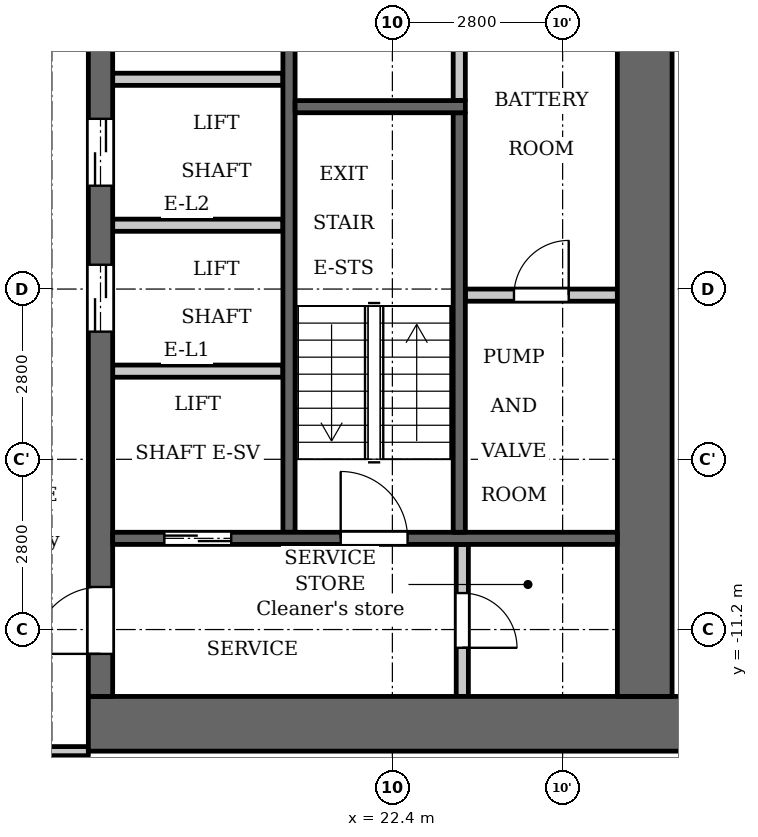
"""IFC4 building model, lengths in metres.
Left out: names, types, materials, properties, quantities, classifications, styles, units other than length and angle.
Written with IfcOpenShell. Run it as: python <this file> out.ifc"""

import sys

from ifc_helpers import new_model, si_unit, direction, frame, frame_2d, origin, place, context, subcontext, project, spatial, rectangle, extrude, element, fill, save


model = new_model("IFC4")
c1 = context("Model", 3, precision=1e-05, world=origin(), true_north=direction((0.0, 1.0)))
c2 = subcontext(c1, "Body", "Model", "MODEL_VIEW")
j1 = project(units=[si_unit("LENGTHUNIT", "METRE"), si_unit("PLANEANGLEUNIT", "RADIAN")], contexts=[c1])
p1 = place(None, origin())
s1 = spatial("IfcSite", under=j1, at=p1, CompositionType="ELEMENT")
p2 = place(p1, origin())
s2 = spatial("IfcBuilding", under=s1, at=p2, CompositionType="ELEMENT")
p3 = place(p2, frame((0.0, 0.0, 58.5)))
s3 = spatial("IfcBuildingStorey", under=s2, at=p3, CompositionType="ELEMENT", Elevation=58.5)
p4 = place(p3, frame((23.5, -2.5, 0.0), z_axis=(0.0, 0.0, 1.0), x_axis=(0.0, 1.0, 0.0)))
e1 = element("IfcWall", 1, at=p4, inside=s3, PredefinedType="PARTITIONING", context=c2, shape_type="SweptSolid", body=[
    extrude(rectangle(XDim=2.65, YDim=0.2, at=frame_2d((1.325, 0.0))), origin(), (0.0, 0.0, 1.0), 3.2),
])
p5 = place(p3, frame((20.7, -9.6, 0.0), z_axis=(0.0, 0.0, 1.0), x_axis=(0.0, 1.0, 0.0)))
e2 = element("IfcWall", 2, at=p5, inside=s3, PredefinedType="SHEAR", context=c2, shape_type="SweptSolid", body=[
    extrude(rectangle(XDim=9.75, YDim=0.2, at=frame_2d((4.875, 0.0))), origin(), (0.0, 0.0, 1.0), 3.2),
])
p6 = place(p3, frame((17.4, -12.75, 0.0), z_axis=(0.0, 0.0, 1.0), x_axis=(1.0, 0.0, 0.0)))
e3 = element("IfcWall", 3, at=p6, inside=s3, PredefinedType="SHEAR", context=c2, shape_type="SweptSolid", body=[
    extrude(rectangle(XDim=10.4, YDim=0.9, at=frame_2d((5.2, 0.0))), origin(), (0.0, 0.0, 1.0), 3.2),
])
p7 = place(p3, frame((17.6, -12.3, 0.0), z_axis=(0.0, 0.0, 1.0), x_axis=(0.0, 1.0, 0.0)))
e4 = element("IfcWall", 4, at=p7, inside=s3, PredefinedType="SHEAR", context=c2, shape_type="SweptSolid", body=[
    extrude(rectangle(XDim=24.6, YDim=0.4, at=frame_2d((12.3, 0.0))), origin(), (0.0, 0.0, 1.0), 3.2),
])
p8 = place(p7, frame((6.0, 0.0, 0.0)))
e5 = element("IfcOpeningElement", 5, at=p8, cuts=e4, PredefinedType="OPENING", context=c2, shape_type="SweptSolid", body=[
    extrude(rectangle(XDim=1.1, YDim=2.1, at=frame_2d((0.55, 1.05))), frame((0.0, 0.21, 0.0), z_axis=(0.0, -1.0, 0.0), x_axis=(1.0, 0.0, 0.0)), (0.0, 0.0, 1.0), 0.42),
])
p9 = place(p7, frame((8.4, 0.0, 0.0)))
e6 = element("IfcOpeningElement", 6, at=p9, cuts=e4, PredefinedType="OPENING", context=c2, shape_type="SweptSolid", body=[
    extrude(rectangle(XDim=1.1, YDim=2.1, at=frame_2d((0.55, 1.05))), frame((0.0, 0.21, 0.0), z_axis=(0.0, -1.0, 0.0), x_axis=(1.0, 0.0, 0.0)), (0.0, 0.0, 1.0), 0.42),
])
p10 = place(p7, frame((10.8, 0.0, 0.0)))
e7 = element("IfcOpeningElement", 7, at=p10, cuts=e4, PredefinedType="OPENING", context=c2, shape_type="SweptSolid", body=[
    extrude(rectangle(XDim=1.1, YDim=2.1, at=frame_2d((0.55, 1.05))), frame((0.0, 0.21, 0.0), z_axis=(0.0, -1.0, 0.0), x_axis=(1.0, 0.0, 0.0)), (0.0, 0.0, 1.0), 0.42),
])
p11 = place(p7, frame((16.75, 0.0, 0.0)))
e8 = element("IfcOpeningElement", 8, at=p11, cuts=e4, PredefinedType="OPENING", context=c2, shape_type="SweptSolid", body=[
    extrude(rectangle(XDim=0.9, YDim=2.1, at=frame_2d((0.45, 1.05))), frame((0.0, 0.21, 0.0), z_axis=(0.0, -1.0, 0.0), x_axis=(1.0, 0.0, 0.0)), (0.0, 0.0, 1.0), 0.42),
])
p12 = place(p7, frame((22.8, 0.0, 0.0)))
e9 = element("IfcOpeningElement", 9, at=p12, cuts=e4, PredefinedType="OPENING", context=c2, shape_type="SweptSolid", body=[
    extrude(rectangle(XDim=1.1, YDim=2.1, at=frame_2d((0.55, 1.05))), frame((0.0, 0.21, 0.0), z_axis=(0.0, -1.0, 0.0), x_axis=(1.0, 0.0, 0.0)), (0.0, 0.0, 1.0), 0.42),
])
p13 = place(p7, frame((0.7, 0.0, 0.0)))
e10 = element("IfcOpeningElement", 10, at=p13, cuts=e4, PredefinedType="OPENING", context=c2, shape_type="SweptSolid", body=[
    extrude(rectangle(XDim=1.1, YDim=2.1, at=frame_2d((0.55, 1.05))), frame((0.0, 0.21, 0.0), z_axis=(0.0, -1.0, 0.0), x_axis=(1.0, 0.0, 0.0)), (0.0, 0.0, 1.0), 0.42),
])
p14 = place(p7, frame((12.775, 0.0, 0.0)))
e11 = element("IfcOpeningElement", 11, at=p14, cuts=e4, PredefinedType="OPENING", context=c2, shape_type="SweptSolid", body=[
    extrude(rectangle(XDim=1.8, YDim=2.1, at=frame_2d((0.9, 1.05))), frame((0.0, 0.21, 0.0), z_axis=(0.0, -1.0, 0.0), x_axis=(1.0, 0.0, 0.0)), (0.0, 0.0, 1.0), 0.42),
])
p15 = place(p3, frame((26.55, -12.3, 0.0), z_axis=(0.0, 0.0, 1.0), x_axis=(0.0, 1.0, 0.0)))
e12 = element("IfcWall", 12, at=p15, inside=s3, PredefinedType="SHEAR", context=c2, shape_type="SweptSolid", body=[
    extrude(rectangle(XDim=24.6, YDim=0.9, at=frame_2d((12.3, 0.0))), origin(), (0.0, 0.0, 1.0), 3.2),
])
p16 = place(p3, frame((23.55, -12.3, 0.0), z_axis=(0.0, 0.0, 1.0), x_axis=(0.0, 1.0, 0.0)))
e13 = element("IfcWall", 13, at=p16, inside=s3, PredefinedType="PARTITIONING", context=c2, shape_type="SweptSolid", body=[
    extrude(rectangle(XDim=2.5, YDim=0.2, at=frame_2d((1.25, 0.0))), origin(), (0.0, 0.0, 1.0), 3.2),
])
p17 = place(p16, frame((0.8, 0.0, 0.0)))
e14 = element("IfcOpeningElement", 14, at=p17, cuts=e13, PredefinedType="OPENING", context=c2, shape_type="SweptSolid", body=[
    extrude(rectangle(XDim=0.9, YDim=2.1, at=frame_2d((0.45, 1.05))), frame((0.0, 0.11, 0.0), z_axis=(0.0, -1.0, 0.0), x_axis=(1.0, 0.0, 0.0)), (0.0, 0.0, 1.0), 0.22),
])
p18 = place(p3, frame((23.6, -5.7, 0.0), z_axis=(0.0, 0.0, 1.0), x_axis=(1.0, 0.0, 0.0)))
e15 = element("IfcWall", 15, at=p18, inside=s3, PredefinedType="PARTITIONING", context=c2, shape_type="SweptSolid", body=[
    extrude(rectangle(XDim=2.5, YDim=0.2, at=frame_2d((1.25, 0.0))), origin(), (0.0, 0.0, 1.0), 3.2),
])
p19 = place(p18, frame((0.8, 0.0, 0.0)))
e16 = element("IfcOpeningElement", 16, at=p19, cuts=e15, PredefinedType="OPENING", context=c2, shape_type="SweptSolid", body=[
    extrude(rectangle(XDim=0.9, YDim=2.1, at=frame_2d((0.45, 1.05))), frame((0.0, 0.11, 0.0), z_axis=(0.0, -1.0, 0.0), x_axis=(1.0, 0.0, 0.0)), (0.0, 0.0, 1.0), 0.22),
])
p20 = place(p3, frame((17.8, -9.7, 0.0), z_axis=(0.0, 0.0, 1.0), x_axis=(1.0, 0.0, 0.0)))
e17 = element("IfcWall", 17, at=p20, inside=s3, PredefinedType="SHEAR", context=c2, shape_type="SweptSolid", body=[
    extrude(rectangle(XDim=8.3, YDim=0.2, at=frame_2d((4.15, 0.0))), origin(), (0.0, 0.0, 1.0), 3.2),
])
p21 = place(p20, frame((0.85, 0.0, 0.0)))
e18 = element("IfcOpeningElement", 18, at=p21, cuts=e17, PredefinedType="OPENING", context=c2, shape_type="SweptSolid", body=[
    extrude(rectangle(XDim=1.1, YDim=2.1, at=frame_2d((0.55, 1.05))), frame((0.0, 0.11, 0.0), z_axis=(0.0, -1.0, 0.0), x_axis=(1.0, 0.0, 0.0)), (0.0, 0.0, 1.0), 0.22),
])
p22 = place(p20, frame((3.75, 0.0, 0.0)))
e19 = element("IfcOpeningElement", 19, at=p22, cuts=e17, PredefinedType="OPENING", context=c2, shape_type="SweptSolid", body=[
    extrude(rectangle(XDim=1.1, YDim=2.1, at=frame_2d((0.55, 1.05))), frame((0.0, 0.11, 0.0), z_axis=(0.0, -1.0, 0.0), x_axis=(1.0, 0.0, 0.0)), (0.0, 0.0, 1.0), 0.22),
])
for number, where, z_axis, x_axis in (
    (20, (17.8, -6.95, 0.0), (0.0, 0.0, 1.0), (1.0, 0.0, 0.0)),
    (21, (17.8, -4.55, 0.0), (0.0, 0.0, 1.0), (1.0, 0.0, 0.0)),
    (22, (17.8, -2.15, 0.0), (0.0, 0.0, 1.0), (1.0, 0.0, 0.0)),
):
    element("IfcWall", number, at=place(p3, frame(where, z_axis=z_axis, x_axis=x_axis)), inside=s3, PredefinedType="PARTITIONING", context=c2, shape_type="SweptSolid", body=[
        extrude(rectangle(XDim=2.8, YDim=0.2, at=frame_2d((1.4, 0.0))), origin(), (0.0, 0.0, 1.0), 3.2),
    ])
p23 = place(p3, frame((23.5, -9.6, 0.0), z_axis=(0.0, 0.0, 1.0), x_axis=(0.0, 1.0, 0.0)))
e23 = element("IfcWall", 23, at=p23, inside=s3, PredefinedType="SHEAR", context=c2, shape_type="SweptSolid", body=[
    extrude(rectangle(XDim=6.9, YDim=0.2, at=frame_2d((3.45, 0.0))), origin(), (0.0, 0.0, 1.0), 3.2),
])
p24 = place(p3, frame((20.8, -2.6, 0.0), z_axis=(0.0, 0.0, 1.0), x_axis=(1.0, 0.0, 0.0)))
e24 = element("IfcWall", 24, at=p24, inside=s3, PredefinedType="SHEAR", context=c2, shape_type="SweptSolid", body=[
    extrude(rectangle(XDim=2.8, YDim=0.2, at=frame_2d((1.4, 0.0))), origin(), (0.0, 0.0, 1.0), 3.2),
])
p25 = place(p3, frame((-17.4, -13.2, 0.0), z_axis=(0.0, 0.0, 1.0), x_axis=(1.0, 0.0, 0.0)))
e25 = element("IfcWall", 25, at=p25, inside=s3, PredefinedType="PARTITIONING", context=c2, shape_type="SweptSolid", body=[
    extrude(rectangle(XDim=34.8, YDim=0.15, at=frame_2d((17.4, 0.0))), origin(), (0.0, 0.0, 1.0), 3.2),
])
p26 = place(p25, frame((0.65, 0.0, 0.0)))
e26 = element("IfcOpeningElement", 26, at=p26, cuts=e25, PredefinedType="OPENING", context=c2, shape_type="SweptSolid", body=[
    extrude(rectangle(XDim=1.0, YDim=2.1, at=frame_2d((0.5, 1.05))), frame((0.0, 0.085, 0.0), z_axis=(0.0, -1.0, 0.0), x_axis=(1.0, 0.0, 0.0)), (0.0, 0.0, 1.0), 0.17),
])
p27 = place(p25, frame((33.05, 0.0, 0.0)))
e27 = element("IfcOpeningElement", 27, at=p27, cuts=e25, PredefinedType="OPENING", context=c2, shape_type="SweptSolid", body=[
    extrude(rectangle(XDim=1.0, YDim=2.1, at=frame_2d((0.5, 1.05))), frame((0.0, 0.085, 0.0), z_axis=(0.0, -1.0, 0.0), x_axis=(1.0, 0.0, 0.0)), (0.0, 0.0, 1.0), 0.17),
])
p28 = place(p25, frame((10.15, 0.0, 0.0)))
e28 = element("IfcOpeningElement", 28, at=p28, cuts=e25, PredefinedType="OPENING", context=c2, shape_type="SweptSolid", body=[
    extrude(rectangle(XDim=1.0, YDim=2.1, at=frame_2d((0.5, 1.05))), frame((0.0, 0.085, 0.0), z_axis=(0.0, -1.0, 0.0), x_axis=(1.0, 0.0, 0.0)), (0.0, 0.0, 1.0), 0.17),
])
p29 = place(p25, frame((21.35, 0.0, 0.0)))
e29 = element("IfcOpeningElement", 29, at=p29, cuts=e25, PredefinedType="OPENING", context=c2, shape_type="SweptSolid", body=[
    extrude(rectangle(XDim=1.0, YDim=2.1, at=frame_2d((0.5, 1.05))), frame((0.0, 0.085, 0.0), z_axis=(0.0, -1.0, 0.0), x_axis=(1.0, 0.0, 0.0)), (0.0, 0.0, 1.0), 0.17),
])
p30 = place(p25, frame((30.75, 0.0, 0.0)))
e30 = element("IfcOpeningElement", 30, at=p30, cuts=e25, PredefinedType="OPENING", context=c2, shape_type="SweptSolid", body=[
    extrude(rectangle(XDim=1.0, YDim=2.1, at=frame_2d((0.5, 1.05))), frame((0.0, 0.085, 0.0), z_axis=(0.0, -1.0, 0.0), x_axis=(1.0, 0.0, 0.0)), (0.0, 0.0, 1.0), 0.17),
])
p31 = place(p21, origin())
e31 = element("IfcDoor", 31, at=p31, inside=s3, OperationType="DOUBLE_DOOR_SLIDING", PredefinedType="DOOR", context=c2, shape_type="SweptSolid", body=[
    extrude(rectangle(XDim=1.1, YDim=2.1, at=frame_2d((0.55, 1.05))), frame((0.0, 0.025, 0.0), z_axis=(0.0, -1.0, 0.0), x_axis=(1.0, 0.0, 0.0)), (0.0, 0.0, 1.0), 0.05),
])
fill(e18, e31)
p32 = place(p8, origin())
e32 = element("IfcDoor", 32, at=p32, inside=s3, OperationType="DOUBLE_DOOR_SLIDING", PredefinedType="DOOR", context=c2, shape_type="SweptSolid", body=[
    extrude(rectangle(XDim=1.1, YDim=2.1, at=frame_2d((0.55, 1.05))), frame((0.0, 0.025, 0.0), z_axis=(0.0, -1.0, 0.0), x_axis=(1.0, 0.0, 0.0)), (0.0, 0.0, 1.0), 0.05),
])
fill(e5, e32)
p33 = place(p9, origin())
e33 = element("IfcDoor", 33, at=p33, inside=s3, OperationType="DOUBLE_DOOR_SLIDING", PredefinedType="DOOR", context=c2, shape_type="SweptSolid", body=[
    extrude(rectangle(XDim=1.1, YDim=2.1, at=frame_2d((0.55, 1.05))), frame((0.0, 0.025, 0.0), z_axis=(0.0, -1.0, 0.0), x_axis=(1.0, 0.0, 0.0)), (0.0, 0.0, 1.0), 0.05),
])
fill(e6, e33)
p34 = place(p13, origin())
e34 = element("IfcDoor", 34, at=p34, inside=s3, OperationType="SINGLE_SWING_RIGHT", PredefinedType="DOOR", context=c2, shape_type="SweptSolid", body=[
    extrude(rectangle(XDim=1.1, YDim=2.1, at=frame_2d((0.55, 1.05))), frame((0.0, 0.025, 0.0), z_axis=(0.0, -1.0, 0.0), x_axis=(1.0, 0.0, 0.0)), (0.0, 0.0, 1.0), 0.05),
])
fill(e10, e34)
p35 = place(p17, origin())
e35 = element("IfcDoor", 35, at=p35, inside=s3, OperationType="SINGLE_SWING_LEFT", PredefinedType="DOOR", context=c2, shape_type="SweptSolid", body=[
    extrude(rectangle(XDim=0.9, YDim=2.1, at=frame_2d((0.45, 1.05))), frame((0.0, 0.025, 0.0), z_axis=(0.0, -1.0, 0.0), x_axis=(1.0, 0.0, 0.0)), (0.0, 0.0, 1.0), 0.05),
])
fill(e14, e35)
p36 = place(p22, origin())
e36 = element("IfcDoor", 36, at=p36, inside=s3, OperationType="SINGLE_SWING_RIGHT", PredefinedType="DOOR", context=c2, shape_type="SweptSolid", body=[
    extrude(rectangle(XDim=1.1, YDim=2.1, at=frame_2d((0.55, 1.05))), frame((0.0, 0.025, 0.0), z_axis=(0.0, -1.0, 0.0), x_axis=(1.0, 0.0, 0.0)), (0.0, 0.0, 1.0), 0.05),
])
fill(e19, e36)
p37 = place(p19, origin())
e37 = element("IfcDoor", 37, at=p37, inside=s3, OperationType="SINGLE_SWING_LEFT", PredefinedType="DOOR", context=c2, shape_type="SweptSolid", body=[
    extrude(rectangle(XDim=0.9, YDim=2.1, at=frame_2d((0.45, 1.05))), frame((0.0, 0.025, 0.0), z_axis=(0.0, -1.0, 0.0), x_axis=(1.0, 0.0, 0.0)), (0.0, 0.0, 1.0), 0.05),
])
fill(e16, e37)
save(model, sys.argv[1])
